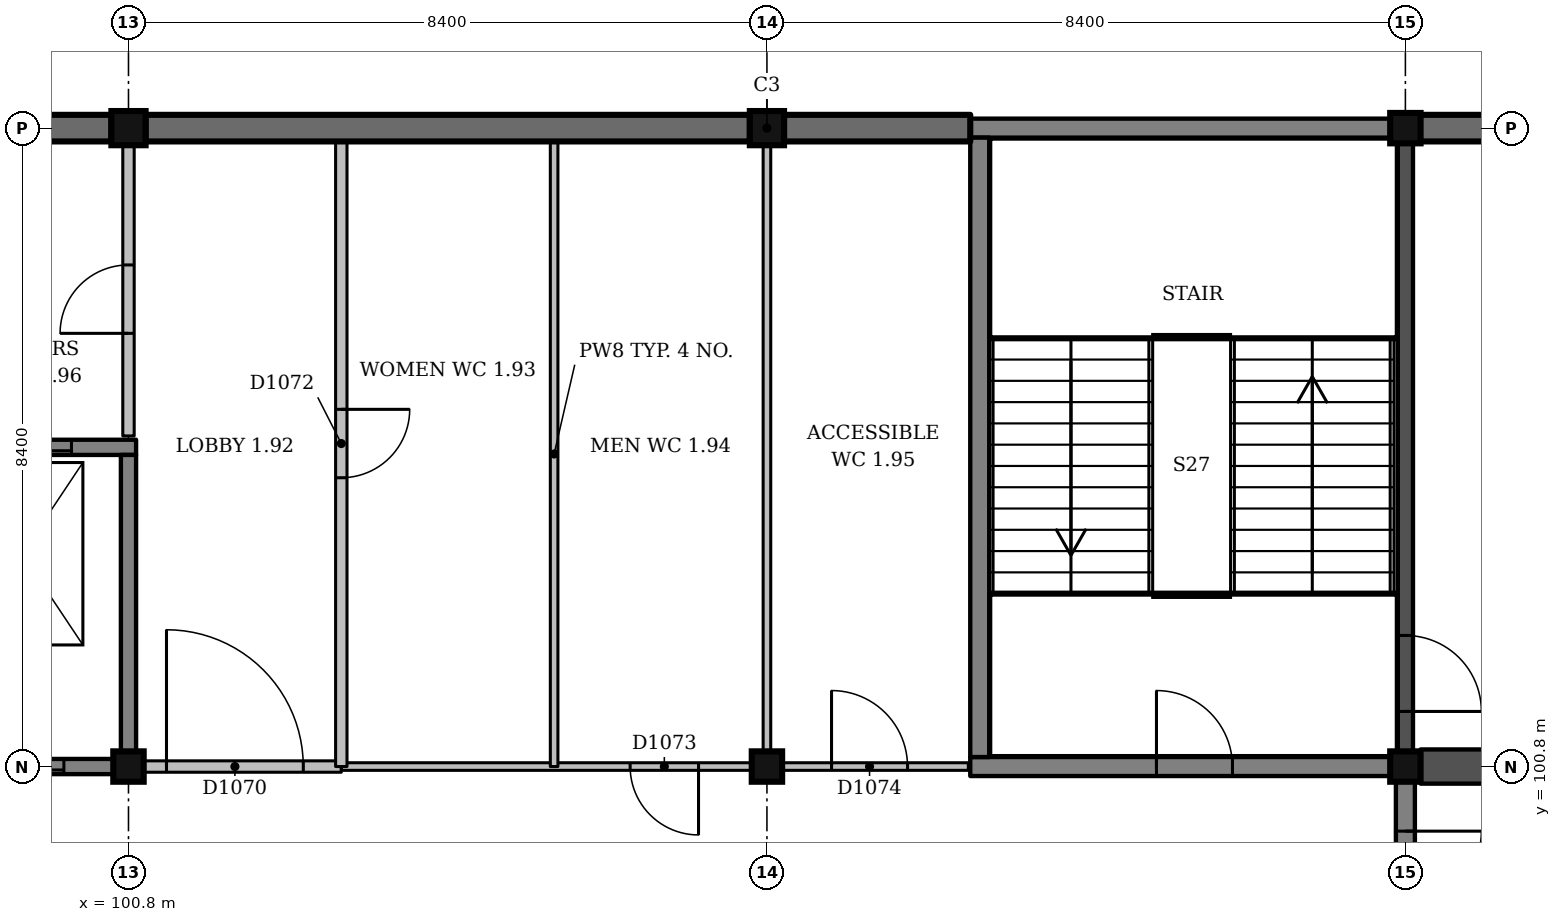
"""IFC4 building model, lengths in metres.
Left out: names, types, materials, properties, quantities, classifications, styles, units other than length and angle.
Written with IfcOpenShell. Run it as: python <this file> out.ifc"""

import sys

from ifc_helpers import new_model, si_unit, direction, frame, frame_2d, origin, origin_2d, place, context, subcontext, project, spatial, rectangle, extrude, element, fill, save


model = new_model("IFC4")
c1 = context("Model", 3, precision=1e-05, world=origin(), true_north=direction((0.0, 1.0)))
c2 = subcontext(c1, "Body", "Model", "MODEL_VIEW")
j1 = project(units=[si_unit("LENGTHUNIT", "METRE"), si_unit("PLANEANGLEUNIT", "RADIAN")], contexts=[c1])
p1 = place(None, origin())
s1 = spatial("IfcSite", under=j1, at=p1, CompositionType="ELEMENT")
p2 = place(p1, origin())
s2 = spatial("IfcBuilding", under=s1, at=p2, CompositionType="ELEMENT")
p3 = place(p2, frame((0.0, 0.0, 4.5)))
s3 = spatial("IfcBuildingStorey", under=s2, at=p3, CompositionType="ELEMENT", Elevation=4.5)
for number, where, z_axis, x_axis in (
    (1, (117.6, 100.8, -1.5), (0.0, 0.0, 1.0), (1.0, 0.0, 0.0)),
    (2, (100.8, 100.8, -1.5), (0.0, 0.0, 1.0), (1.0, 0.0, 0.0)),
):
    element("IfcColumn", number, at=place(p3, frame(where, z_axis=z_axis, x_axis=x_axis)), inside=s3, PredefinedType="COLUMN", context=c2, shape_type="SweptSolid", body=[
        extrude(rectangle(XDim=0.4, YDim=0.4, at=origin_2d()), origin(), (0.0, 0.0, 1.0), 6.0),
    ])
p4 = place(p3, frame((100.8, 109.2, -0.25), z_axis=(0.0, 0.0, 1.0), x_axis=(1.0, 0.0, 0.0)))
e3 = element("IfcColumn", 3, at=p4, inside=s3, PredefinedType="COLUMN", context=c2, shape_type="SweptSolid", body=[
    extrude(rectangle(XDim=0.45, YDim=0.45, at=origin_2d()), origin(), (0.0, 0.0, 1.0), 4.75),
])
p5 = place(p3, frame((109.2, 100.8, -1.5), z_axis=(0.0, 0.0, 1.0), x_axis=(1.0, 0.0, 0.0)))
e4 = element("IfcColumn", 4, at=p5, inside=s3, PredefinedType="COLUMN", context=c2, shape_type="SweptSolid", body=[
    extrude(rectangle(XDim=0.4, YDim=0.4, at=origin_2d()), origin(), (0.0, 0.0, 1.0), 6.0),
])
p6 = place(p3, frame((109.2, 109.2, -0.25), z_axis=(0.0, 0.0, 1.0), x_axis=(1.0, 0.0, 0.0)))
e5 = element("IfcColumn", 5, at=p6, inside=s3, PredefinedType="COLUMN", context=c2, shape_type="SweptSolid", body=[
    extrude(rectangle(XDim=0.45, YDim=0.45, at=origin_2d()), origin(), (0.0, 0.0, 1.0), 4.75),
])
p7 = place(p3, frame((117.6, 109.2, -0.25), z_axis=(0.0, 0.0, 1.0), x_axis=(1.0, 0.0, 0.0)))
e6 = element("IfcColumn", 6, at=p7, inside=s3, PredefinedType="COLUMN", context=c2, shape_type="SweptSolid", body=[
    extrude(rectangle(XDim=0.4, YDim=0.4, at=origin_2d()), origin(), (0.0, 0.0, 1.0), 4.75),
])
p8 = place(p3, frame((97.9, 100.8, 0.0), z_axis=(0.0, 0.0, 1.0), x_axis=(1.0, 0.0, 0.0)))
e7 = element("IfcWall", 7, at=p8, inside=s3, PredefinedType="SHEAR", context=c2, shape_type="SweptSolid", body=[
    extrude(rectangle(XDim=2.7, YDim=0.2, at=frame_2d((1.35, 0.0))), origin(), (0.0, 0.0, 1.0), 4.5),
])
p9 = place(p8, frame((0.95, 0.0, 0.0)))
e8 = element("IfcOpeningElement", 8, at=p9, cuts=e7, PredefinedType="OPENING", context=c2, shape_type="SweptSolid", body=[
    extrude(rectangle(XDim=1.1, YDim=2.1, at=frame_2d((0.55, 1.05))), frame((0.0, 0.11, 0.0), z_axis=(0.0, -1.0, 0.0), x_axis=(1.0, 0.0, 0.0)), (0.0, 0.0, 1.0), 0.22),
])
p10 = place(p3, frame((97.9, 105.0, 0.0), z_axis=(0.0, 0.0, 1.0), x_axis=(1.0, 0.0, 0.0)))
e9 = element("IfcWall", 9, at=p10, inside=s3, PredefinedType="SHEAR", context=c2, shape_type="SweptSolid", body=[
    extrude(rectangle(XDim=3.0, YDim=0.2, at=frame_2d((1.5, 0.0))), origin(), (0.0, 0.0, 1.0), 4.5),
])
p11 = place(p10, frame((1.05, 0.0, 0.0)))
e10 = element("IfcOpeningElement", 10, at=p11, cuts=e9, PredefinedType="OPENING", context=c2, shape_type="SweptSolid", body=[
    extrude(rectangle(XDim=1.1, YDim=2.1, at=frame_2d((0.55, 1.05))), frame((0.0, 0.11, 0.0), z_axis=(0.0, -1.0, 0.0), x_axis=(1.0, 0.0, 0.0)), (0.0, 0.0, 1.0), 0.22),
])
p12 = place(p3, frame((100.8, 101.0, 0.0), z_axis=(0.0, 0.0, 1.0), x_axis=(0.0, 1.0, 0.0)))
e11 = element("IfcWall", 11, at=p12, inside=s3, PredefinedType="SHEAR", context=c2, shape_type="SweptSolid", body=[
    extrude(rectangle(XDim=3.9, YDim=0.2, at=frame_2d((1.95, 0.0))), origin(), (0.0, 0.0, 1.0), 4.5),
])
p13 = place(p3, frame((117.6, 92.6, 0.0), z_axis=(0.0, 0.0, 1.0), x_axis=(0.0, 1.0, 0.0)))
e12 = element("IfcWall", 12, at=p13, inside=s3, PredefinedType="SHEAR", context=c2, shape_type="SweptSolid", body=[
    extrude(rectangle(XDim=8.0, YDim=0.25, at=frame_2d((4.0, 0.0))), origin(), (0.0, 0.0, 1.0), 4.5),
])
p14 = place(p13, frame((6.35, 0.0, 0.0)))
e13 = element("IfcOpeningElement", 13, at=p14, cuts=e12, PredefinedType="OPENING", context=c2, shape_type="SweptSolid", body=[
    extrude(rectangle(XDim=1.0, YDim=2.1, at=frame_2d((0.5, 1.05))), frame((0.0, 0.135, 0.0), z_axis=(0.0, -1.0, 0.0), x_axis=(1.0, 0.0, 0.0)), (0.0, 0.0, 1.0), 0.27),
])
p15 = place(p3, frame((111.875, 100.8, 0.0), z_axis=(0.0, 0.0, 1.0), x_axis=(1.0, 0.0, 0.0)))
e14 = element("IfcWall", 14, at=p15, inside=s3, PredefinedType="SHEAR", context=c2, shape_type="SweptSolid", body=[
    extrude(rectangle(XDim=5.525, YDim=0.25, at=frame_2d((2.762, 0.0))), origin(), (0.0, 0.0, 1.0), 4.5),
])
p16 = place(p15, frame((2.45, 0.0, 0.0)))
e15 = element("IfcOpeningElement", 15, at=p16, cuts=e14, PredefinedType="OPENING", context=c2, shape_type="SweptSolid", body=[
    extrude(rectangle(XDim=1.0, YDim=2.1, at=frame_2d((0.5, 1.05))), frame((0.0, 0.135, 0.0), z_axis=(0.0, -1.0, 0.0), x_axis=(1.0, 0.0, 0.0)), (0.0, 0.0, 1.0), 0.27),
])
p17 = place(p3, frame((111.875, 109.2, 0.0), z_axis=(0.0, 0.0, 1.0), x_axis=(1.0, 0.0, 0.0)))
e16 = element("IfcWall", 16, at=p17, inside=s3, PredefinedType="SHEAR", context=c2, shape_type="SweptSolid", body=[
    extrude(rectangle(XDim=5.525, YDim=0.25, at=frame_2d((2.762, 0.0))), origin(), (0.0, 0.0, 1.0), 4.5),
])
p18 = place(p3, frame((112.0, 100.925, 0.0), z_axis=(0.0, 0.0, 1.0), x_axis=(0.0, 1.0, 0.0)))
e17 = element("IfcWall", 17, at=p18, inside=s3, PredefinedType="SHEAR", context=c2, shape_type="SweptSolid", body=[
    extrude(rectangle(XDim=8.15, YDim=0.25, at=frame_2d((4.075, 0.0))), origin(), (0.0, 0.0, 1.0), 4.5),
])
p19 = place(p3, frame((108.975, 109.2, -0.25), z_axis=(0.0, 0.0, 1.0), x_axis=(-1.0, 0.0, 0.0)))
e18 = element("IfcWall", 18, at=p19, inside=s3, PredefinedType="SOLIDWALL", context=c2, shape_type="SweptSolid", body=[
    extrude(rectangle(XDim=7.95, YDim=0.35, at=frame_2d((3.975, 0.0))), origin(), (0.0, 0.0, 1.0), 3.75),
])
p20 = place(p3, frame((117.6, 109.2, 0.0), z_axis=(0.0, 0.0, 1.0), x_axis=(1.0, 0.0, 0.0)))
e19 = element("IfcWall", 19, at=p20, inside=s3, PredefinedType="SOLIDWALL", context=c2, shape_type="SweptSolid", body=[
    extrude(rectangle(XDim=25.2, YDim=0.35, at=frame_2d((12.6, 0.0))), origin(), (0.0, 0.0, 1.0), 4.25),
])
p21 = place(p3, frame((121.74, 100.8, 0.0), z_axis=(0.0, 0.0, 1.0), x_axis=(-1.0, 0.0, 0.0)))
e20 = element("IfcWall", 20, at=p21, inside=s3, PredefinedType="SOLIDWALL", context=c2, shape_type="SweptSolid", body=[
    extrude(rectangle(XDim=3.94, YDim=0.45, at=frame_2d((1.97, 0.0))), origin(), (0.0, 0.0, 1.0), 3.35),
])
p22 = place(p21, frame((1.815, 0.0, 0.0), z_axis=(0.0, 0.0, 1.0), x_axis=(-1.0, 0.0, 0.0)))
e21 = element("IfcOpeningElement", 21, at=p22, cuts=e20, PredefinedType="OPENING", context=c2, shape_type="SweptSolid", body=[
    extrude(rectangle(XDim=1.0, YDim=2.1, at=frame_2d((0.5, 1.05))), frame((0.0, 0.235, 0.0), z_axis=(0.0, -1.0, 0.0), x_axis=(1.0, 0.0, 0.0)), (0.0, 0.0, 1.0), 0.47),
])
p23 = place(p3, frame((117.6, 101.0, 0.0), z_axis=(0.0, 0.0, 1.0), x_axis=(0.0, 1.0, 0.0)))
e22 = element("IfcWall", 22, at=p23, inside=s3, PredefinedType="SOLIDWALL", context=c2, shape_type="SweptSolid", body=[
    extrude(rectangle(XDim=8.0, YDim=0.2, at=frame_2d((4.0, 0.0))), origin(), (0.0, 0.0, 1.0), 3.65),
])
p24 = place(p23, frame((1.525, 0.0, 0.0), z_axis=(0.0, 0.0, 1.0), x_axis=(-1.0, 0.0, 0.0)))
e23 = element("IfcOpeningElement", 23, at=p24, cuts=e22, PredefinedType="OPENING", context=c2, shape_type="SweptSolid", body=[
    extrude(rectangle(XDim=1.0, YDim=2.1, at=frame_2d((0.5, 1.05))), frame((0.0, 0.11, 0.0), z_axis=(0.0, -1.0, 0.0), x_axis=(1.0, 0.0, 0.0)), (0.0, 0.0, 1.0), 0.22),
])
p25 = place(p3, frame((101.0, 100.8, 0.0), z_axis=(0.0, 0.0, 1.0), x_axis=(1.0, 0.0, 0.0)))
e24 = element("IfcWall", 24, at=p25, inside=s3, PredefinedType="PARTITIONING", context=c2, shape_type="SweptSolid", body=[
    extrude(rectangle(XDim=2.6, YDim=0.15, at=frame_2d((1.3, 0.0))), origin(), (0.0, 0.0, 1.0), 3.5),
])
p26 = place(p25, frame((0.3, 0.0, 0.0)))
e25 = element("IfcOpeningElement", 25, at=p26, cuts=e24, PredefinedType="OPENING", context=c2, shape_type="SweptSolid", body=[
    extrude(rectangle(XDim=1.8, YDim=2.1, at=frame_2d((0.9, 1.05))), frame((0.0, 0.085, 0.0), z_axis=(0.0, -1.0, 0.0), x_axis=(1.0, 0.0, 0.0)), (0.0, 0.0, 1.0), 0.17),
])
p27 = place(p3, frame((103.6, 100.8, 0.0), z_axis=(0.0, 0.0, 1.0), x_axis=(1.0, 0.0, 0.0)))
e26 = element("IfcWall", 26, at=p27, inside=s3, PredefinedType="PARTITIONING", context=c2, shape_type="SweptSolid", body=[
    extrude(rectangle(XDim=5.4, YDim=0.1, at=frame_2d((2.7, 0.0))), origin(), (0.0, 0.0, 1.0), 3.5),
])
p28 = place(p27, frame((3.8, 0.0, 0.0)))
e27 = element("IfcOpeningElement", 27, at=p28, cuts=e26, PredefinedType="OPENING", context=c2, shape_type="SweptSolid", body=[
    extrude(rectangle(XDim=0.9, YDim=2.1, at=frame_2d((0.45, 1.05))), frame((0.0, 0.06, 0.0), z_axis=(0.0, -1.0, 0.0), x_axis=(1.0, 0.0, 0.0)), (0.0, 0.0, 1.0), 0.12),
])
p29 = place(p3, frame((109.4, 100.8, 0.0), z_axis=(0.0, 0.0, 1.0), x_axis=(1.0, 0.0, 0.0)))
e28 = element("IfcWall", 28, at=p29, inside=s3, PredefinedType="PARTITIONING", context=c2, shape_type="SweptSolid", body=[
    extrude(rectangle(XDim=2.45, YDim=0.1, at=frame_2d((1.225, 0.0))), origin(), (0.0, 0.0, 1.0), 3.5),
])
p30 = place(p29, frame((0.65, 0.0, 0.0)))
e29 = element("IfcOpeningElement", 29, at=p30, cuts=e28, PredefinedType="OPENING", context=c2, shape_type="SweptSolid", body=[
    extrude(rectangle(XDim=1.0, YDim=2.1, at=frame_2d((0.5, 1.05))), frame((0.0, 0.06, 0.0), z_axis=(0.0, -1.0, 0.0), x_axis=(1.0, 0.0, 0.0)), (0.0, 0.0, 1.0), 0.12),
])
p31 = place(p3, frame((100.8, 105.15, 0.0), z_axis=(0.0, 0.0, 1.0), x_axis=(0.0, 1.0, 0.0)))
e30 = element("IfcWall", 30, at=p31, inside=s3, PredefinedType="PARTITIONING", context=c2, shape_type="SweptSolid", body=[
    extrude(rectangle(XDim=3.825, YDim=0.15, at=frame_2d((1.913, 0.0))), origin(), (0.0, 0.0, 1.0), 3.65),
])
p32 = place(p31, frame((1.35, 0.0, 0.0)))
e31 = element("IfcOpeningElement", 31, at=p32, cuts=e30, PredefinedType="OPENING", context=c2, shape_type="SweptSolid", body=[
    extrude(rectangle(XDim=0.9, YDim=2.1, at=frame_2d((0.45, 1.05))), frame((0.0, 0.085, 0.0), z_axis=(0.0, -1.0, 0.0), x_axis=(1.0, 0.0, 0.0)), (0.0, 0.0, 1.0), 0.17),
])
p33 = place(p3, frame((103.6, 100.8, 0.0), z_axis=(0.0, 0.0, 1.0), x_axis=(0.0, 1.0, 0.0)))
e32 = element("IfcWall", 32, at=p33, inside=s3, PredefinedType="PARTITIONING", context=c2, shape_type="SweptSolid", body=[
    extrude(rectangle(XDim=8.225, YDim=0.15, at=frame_2d((4.112, 0.0))), origin(), (0.0, 0.0, 1.0), 3.5),
])
p34 = place(p33, frame((3.8, 0.0, 0.0)))
e33 = element("IfcOpeningElement", 33, at=p34, cuts=e32, PredefinedType="OPENING", context=c2, shape_type="SweptSolid", body=[
    extrude(rectangle(XDim=0.9, YDim=2.1, at=frame_2d((0.45, 1.05))), frame((0.0, 0.085, 0.0), z_axis=(0.0, -1.0, 0.0), x_axis=(1.0, 0.0, 0.0)), (0.0, 0.0, 1.0), 0.17),
])
p35 = place(p3, frame((106.4, 100.8, 0.0), z_axis=(0.0, 0.0, 1.0), x_axis=(0.0, 1.0, 0.0)))
e34 = element("IfcWall", 34, at=p35, inside=s3, PredefinedType="PARTITIONING", context=c2, shape_type="SweptSolid", body=[
    extrude(rectangle(XDim=8.225, YDim=0.1, at=frame_2d((4.112, 0.0))), origin(), (0.0, 0.0, 1.0), 3.5),
])
p36 = place(p3, frame((109.2, 101.0, 0.0), z_axis=(0.0, 0.0, 1.0), x_axis=(0.0, 1.0, 0.0)))
e35 = element("IfcWall", 35, at=p36, inside=s3, PredefinedType="PARTITIONING", context=c2, shape_type="SweptSolid", body=[
    extrude(rectangle(XDim=7.975, YDim=0.1, at=frame_2d((3.988, 0.0))), origin(), (0.0, 0.0, 1.0), 3.55),
])
for number, where, z_axis, x_axis in (
    (36, (111.875, 109.2, -0.25), (0.0, 0.0, 1.0), (-1.0, 0.0, 0.0)),
    (37, (100.575, 109.2, -0.25), (0.0, 0.0, 1.0), (-1.0, 0.0, 0.0)),
):
    element("IfcWall", number, at=place(p3, frame(where, z_axis=z_axis, x_axis=x_axis)), inside=s3, PredefinedType="SOLIDWALL", context=c2, shape_type="SweptSolid", body=[
        extrude(rectangle(XDim=2.45, YDim=0.35, at=frame_2d((1.225, 0.0))), origin(), (0.0, 0.0, 1.0), 3.75),
    ])
p37 = place(p26, origin())
e38 = element("IfcDoor", 38, at=p37, inside=s3, OperationType="DOUBLE_DOOR_SINGLE_SWING", PredefinedType="DOOR", context=c2, shape_type="SweptSolid", body=[
    extrude(rectangle(XDim=1.8, YDim=2.1, at=frame_2d((0.9, 1.05))), frame((0.0, 0.025, 0.0), z_axis=(0.0, -1.0, 0.0), x_axis=(1.0, 0.0, 0.0)), (0.0, 0.0, 1.0), 0.05),
])
fill(e25, e38)
p38 = place(p34, origin())
e39 = element("IfcDoor", 39, at=p38, inside=s3, OperationType="SINGLE_SWING_RIGHT", PredefinedType="DOOR", context=c2, shape_type="SweptSolid", body=[
    extrude(rectangle(XDim=0.9, YDim=2.1, at=frame_2d((0.45, 1.05))), frame((0.0, 0.025, 0.0), z_axis=(0.0, -1.0, 0.0), x_axis=(1.0, 0.0, 0.0)), (0.0, 0.0, 1.0), 0.05),
])
fill(e33, e39)
p39 = place(p28, origin())
e40 = element("IfcDoor", 40, at=p39, inside=s3, OperationType="SINGLE_SWING_RIGHT", PredefinedType="DOOR", context=c2, shape_type="SweptSolid", body=[
    extrude(rectangle(XDim=0.9, YDim=2.1, at=frame_2d((0.45, 1.05))), frame((0.0, 0.025, 0.0), z_axis=(0.0, -1.0, 0.0), x_axis=(1.0, 0.0, 0.0)), (0.0, 0.0, 1.0), 0.05),
])
fill(e27, e40)
p40 = place(p30, origin())
e41 = element("IfcDoor", 41, at=p40, inside=s3, OperationType="SINGLE_SWING_LEFT", PredefinedType="DOOR", context=c2, shape_type="SweptSolid", body=[
    extrude(rectangle(XDim=1.0, YDim=2.1, at=frame_2d((0.5, 1.05))), frame((0.0, 0.025, 0.0), z_axis=(0.0, -1.0, 0.0), x_axis=(1.0, 0.0, 0.0)), (0.0, 0.0, 1.0), 0.05),
])
fill(e29, e41)
p41 = place(p32, origin())
e42 = element("IfcDoor", 42, at=p41, inside=s3, OperationType="SINGLE_SWING_LEFT", PredefinedType="DOOR", context=c2, shape_type="SweptSolid", body=[
    extrude(rectangle(XDim=0.9, YDim=2.1, at=frame_2d((0.45, 1.05))), frame((0.0, 0.025, 0.0), z_axis=(0.0, -1.0, 0.0), x_axis=(1.0, 0.0, 0.0)), (0.0, 0.0, 1.0), 0.05),
])
fill(e31, e42)
p42 = place(p14, origin())
e43 = element("IfcDoor", 43, at=p42, inside=s3, OperationType="SINGLE_SWING_RIGHT", PredefinedType="DOOR", context=c2, shape_type="SweptSolid", body=[
    extrude(rectangle(XDim=1.0, YDim=2.1, at=frame_2d((0.5, 1.05))), frame((0.0, 0.025, 0.0), z_axis=(0.0, -1.0, 0.0), x_axis=(1.0, 0.0, 0.0)), (0.0, 0.0, 1.0), 0.05),
])
fill(e13, e43)
p43 = place(p16, origin())
e44 = element("IfcDoor", 44, at=p43, inside=s3, OperationType="SINGLE_SWING_LEFT", PredefinedType="DOOR", context=c2, shape_type="SweptSolid", body=[
    extrude(rectangle(XDim=1.0, YDim=2.1, at=frame_2d((0.5, 1.05))), frame((0.0, 0.025, 0.0), z_axis=(0.0, -1.0, 0.0), x_axis=(1.0, 0.0, 0.0)), (0.0, 0.0, 1.0), 0.05),
])
fill(e15, e44)
p44 = place(p24, origin())
e45 = element("IfcDoor", 45, at=p44, inside=s3, OperationType="SINGLE_SWING_LEFT", PredefinedType="DOOR", context=c2, shape_type="SweptSolid", body=[
    extrude(rectangle(XDim=1.0, YDim=2.1, at=frame_2d((0.5, 1.05))), frame((0.0, 0.025, 0.0), z_axis=(0.0, -1.0, 0.0), x_axis=(1.0, 0.0, 0.0)), (0.0, 0.0, 1.0), 0.05),
])
fill(e23, e45)
p45 = place(p9, origin())
e46 = element("IfcDoor", 46, at=p45, inside=s3, OperationType="SLIDING_TO_RIGHT", PredefinedType="DOOR", context=c2, shape_type="SweptSolid", body=[
    extrude(rectangle(XDim=1.1, YDim=2.1, at=frame_2d((0.55, 1.05))), frame((0.0, 0.025, 0.0), z_axis=(0.0, -1.0, 0.0), x_axis=(1.0, 0.0, 0.0)), (0.0, 0.0, 1.0), 0.05),
])
fill(e8, e46)
p46 = place(p11, origin())
e47 = element("IfcDoor", 47, at=p46, inside=s3, OperationType="SLIDING_TO_LEFT", PredefinedType="DOOR", context=c2, shape_type="SweptSolid", body=[
    extrude(rectangle(XDim=1.1, YDim=2.1, at=frame_2d((0.55, 1.05))), frame((0.0, 0.025, 0.0), z_axis=(0.0, -1.0, 0.0), x_axis=(1.0, 0.0, 0.0)), (0.0, 0.0, 1.0), 0.05),
])
fill(e10, e47)
save(model, sys.argv[1])
